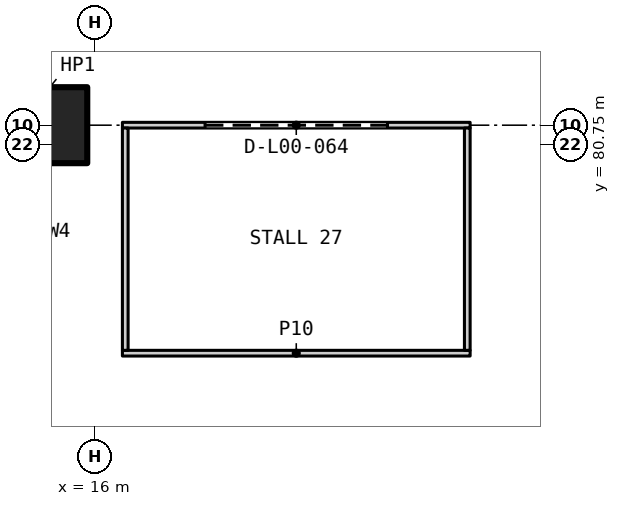
"""IFC4 building model, lengths in metres.
Left out: names, types, materials, properties, quantities, classifications, styles, units other than length and angle.
Written with IfcOpenShell. Run it as: python <this file> out.ifc"""

import sys

from ifc_helpers import new_model, si_unit, direction, frame, frame_2d, origin, origin_2d, place, context, subcontext, project, spatial, rectangle, extrude, element, fill, save


model = new_model("IFC4")
c1 = context("Model", 3, precision=1e-05, world=origin(), true_north=direction((0.0, 1.0)))
c2 = subcontext(c1, "Body", "Model", "MODEL_VIEW")
j1 = project(units=[si_unit("LENGTHUNIT", "METRE"), si_unit("PLANEANGLEUNIT", "RADIAN")], contexts=[c1])
p1 = place(None, origin())
s1 = spatial("IfcSite", under=j1, at=p1, CompositionType="ELEMENT")
p2 = place(p1, origin())
s2 = spatial("IfcBuilding", under=s1, at=p2, CompositionType="ELEMENT")
p3 = place(p2, origin())
s3 = spatial("IfcBuildingStorey", under=s2, at=p3, CompositionType="ELEMENT", Elevation=0.0)
p4 = place(p3, frame((15.0, 81.0, 0.0), z_axis=(0.0, 0.0, 1.0), x_axis=(1.0, 0.0, 0.0)))
e1 = element("IfcColumn", 1, at=p4, inside=s3, PredefinedType="COLUMN", context=c2, shape_type="SweptSolid", body=[
    extrude(rectangle(XDim=1.8, YDim=1.0, at=origin_2d()), origin(), (0.0, 0.0, 1.0), 6.0),
])
p5 = place(p3, frame((16.363, 78.0, 0.0), z_axis=(0.0, 0.0, 1.0), x_axis=(1.0, 0.0, 0.0)))
e2 = element("IfcWall", 2, at=p5, inside=s3, PredefinedType="PARTITIONING", context=c2, shape_type="SweptSolid", body=[
    extrude(rectangle(XDim=4.575, YDim=0.075, at=frame_2d((2.288, 0.0))), origin(), (0.0, 0.0, 1.0), 3.0),
])
p6 = place(p3, frame((16.363, 81.0, 0.0), z_axis=(0.0, 0.0, 1.0), x_axis=(1.0, 0.0, 0.0)))
e3 = element("IfcWall", 3, at=p6, inside=s3, PredefinedType="PARTITIONING", context=c2, shape_type="SweptSolid", body=[
    extrude(rectangle(XDim=4.575, YDim=0.075, at=frame_2d((2.288, 0.0))), origin(), (0.0, 0.0, 1.0), 3.0),
])
p7 = place(p6, frame((1.087, 0.0, 0.0)))
e4 = element("IfcOpeningElement", 4, at=p7, cuts=e3, PredefinedType="OPENING", context=c2, shape_type="SweptSolid", body=[
    extrude(rectangle(XDim=2.4, YDim=2.4, at=frame_2d((1.2, 1.2))), frame((0.0, 0.047, 0.0), z_axis=(0.0, -1.0, 0.0), x_axis=(1.0, 0.0, 0.0)), (0.0, 0.0, 1.0), 0.095),
])
for number, where, z_axis, x_axis in (
    (5, (16.4, 78.038, 0.0), (0.0, 0.0, 1.0), (0.0, 1.0, 0.0)),
    (6, (20.9, 78.038, 0.0), (0.0, 0.0, 1.0), (0.0, 1.0, 0.0)),
):
    element("IfcWall", number, at=place(p3, frame(where, z_axis=z_axis, x_axis=x_axis)), inside=s3, PredefinedType="PARTITIONING", context=c2, shape_type="SweptSolid", body=[
        extrude(rectangle(XDim=2.925, YDim=0.075, at=frame_2d((1.462, 0.0))), origin(), (0.0, 0.0, 1.0), 3.0),
    ])
p8 = place(p7, origin())
e7 = element("IfcDoor", 7, at=p8, inside=s3, OperationType="ROLLINGUP", PredefinedType="DOOR", context=c2, shape_type="SweptSolid", body=[
    extrude(rectangle(XDim=2.4, YDim=2.4, at=frame_2d((1.2, 1.2))), frame((0.0, 0.025, 0.0), z_axis=(0.0, -1.0, 0.0), x_axis=(1.0, 0.0, 0.0)), (0.0, 0.0, 1.0), 0.05),
])
fill(e4, e7)
save(model, sys.argv[1])
